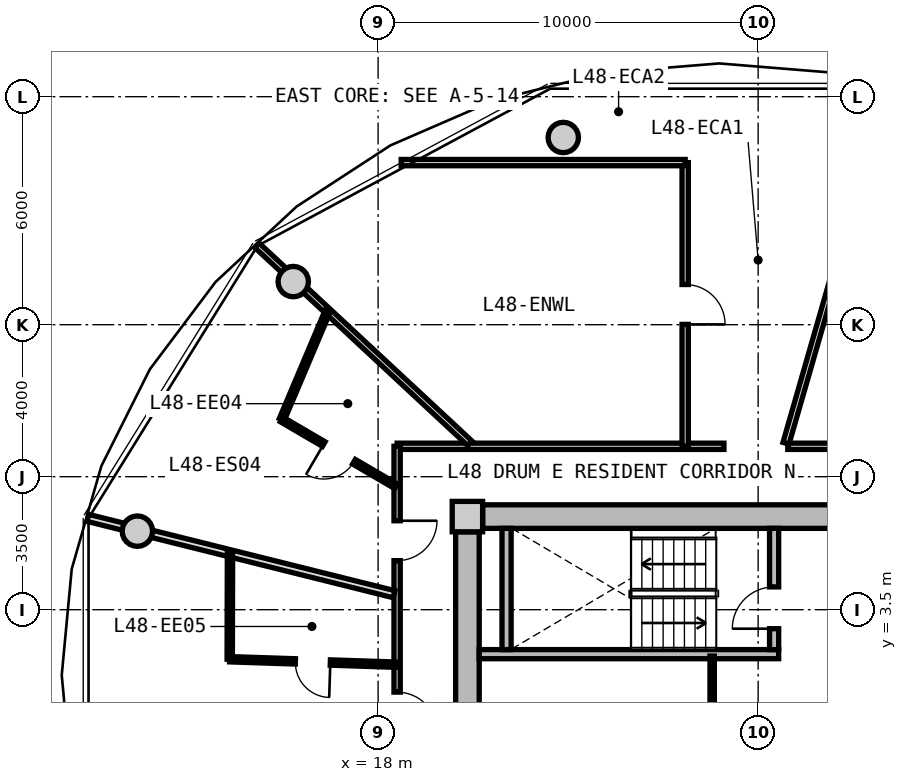
"""IFC4 building model, lengths in metres.
Left out: names, types, materials, properties, quantities, classifications, styles, units other than length and angle.
Written with IfcOpenShell. Run it as: python <this file> out.ifc"""

import sys

from ifc_helpers import new_model, si_unit, direction, frame, frame_2d, origin, origin_2d, place, context, subcontext, project, spatial, rectangle, circle, extrude, source, transform, mapped, element, fill, save


model = new_model("IFC4")
c1 = context("Model", 3, precision=1e-05, world=origin(), true_north=direction((0.0, 1.0)))
c2 = subcontext(c1, "Body", "Model", "MODEL_VIEW")
j1 = project(units=[si_unit("LENGTHUNIT", "METRE"), si_unit("PLANEANGLEUNIT", "RADIAN")], contexts=[c1])
p1 = place(None, origin())
s1 = spatial("IfcSite", under=j1, at=p1, CompositionType="ELEMENT")
p2 = place(p1, origin())
s2 = spatial("IfcBuilding", under=s1, at=p2, CompositionType="ELEMENT")
p3 = place(p2, frame((0.0, 0.0, 155.65)))
s3 = spatial("IfcBuildingStorey", under=s2, at=p3, CompositionType="ELEMENT", Elevation=155.65)
m1 = source(origin(), c2, "Body", "SweptSolid", [
    extrude(rectangle(XDim=0.8, YDim=0.8, at=origin_2d()), origin(), (0.0, 0.0, 1.0), 3.05),
])
p4 = place(p3, frame((20.35, 5.95, 0.0), z_axis=(0.0, 0.0, 1.0), x_axis=(1.0, 0.0, 0.0)))
e1 = element("IfcColumn", 1, at=p4, inside=s3, PredefinedType="COLUMN", context=c2, shape_type="MappedRepresentation", body=[
    mapped(m1, transform((0.0, 0.0, 0.0), x_axis=(1.0, 0.0, 0.0), y_axis=(0.0, 1.0, 0.0), z_axis=(0.0, 0.0, 1.0), scale=1.0)),
])
m2 = source(origin(), c2, "Body", "SweptSolid", [
    extrude(rectangle(XDim=14.5, YDim=0.62, at=frame_2d((7.25, 0.0))), origin(), (0.0, 0.0, 1.0), 2.81),
])
p5 = place(p3, frame((20.75, 5.95, 0.0), z_axis=(0.0, 0.0, 1.0), x_axis=(1.0, 0.0, 0.0)))
e2 = element("IfcWall", 2, at=p5, inside=s3, PredefinedType="SHEAR", context=c2, shape_type="MappedRepresentation", body=[
    mapped(m2, transform((0.0, 0.0, 0.0), x_axis=(1.0, 0.0, 0.0), y_axis=(0.0, 1.0, 0.0), z_axis=(0.0, 0.0, 1.0), scale=1.0)),
])
m3 = source(origin(), c2, "Body", "SweptSolid", [
    extrude(rectangle(XDim=11.1, YDim=0.62, at=frame_2d((5.55, 0.0))), origin(), (0.0, 0.0, 1.0), 2.81),
])
p6 = place(p3, frame((20.35, -5.55, 0.0), z_axis=(0.0, 0.0, 1.0), x_axis=(0.0, 1.0, 0.0)))
e3 = element("IfcWall", 3, at=p6, inside=s3, PredefinedType="SHEAR", context=c2, shape_type="MappedRepresentation", body=[
    mapped(m3, transform((0.0, 0.0, 0.0), x_axis=(1.0, 0.0, 0.0), y_axis=(0.0, 1.0, 0.0), z_axis=(0.0, 0.0, 1.0), scale=1.0)),
])
p7 = place(p6, frame((3.8, 0.0, 0.0)))
e4 = element("IfcOpeningElement", 4, at=p7, cuts=e3, PredefinedType="OPENING", context=c2, shape_type="SweptSolid", body=[
    extrude(rectangle(XDim=1.2, YDim=2.15, at=frame_2d((0.6, 1.075))), frame((0.0, 0.32, 0.0), z_axis=(0.0, -1.0, 0.0), x_axis=(1.0, 0.0, 0.0)), (0.0, 0.0, 1.0), 0.64),
])
m4 = source(origin(), c2, "Body", "SweptSolid", [
    extrude(circle(Radius=0.4, at=origin_2d()), origin(), (0.0, 0.0, 1.0), 3.05),
])
for number, where, z_axis, x_axis in (
    (5, (22.873, 15.926, 0.0), (0.0, 0.0, 1.0), (1.0, 0.0, 0.0)),
    (6, (15.767, 12.135, 0.0), (0.0, 0.0, 1.0), (1.0, 0.0, 0.0)),
    (7, (11.665, 5.567, 0.0), (0.0, 0.0, 1.0), (1.0, 0.0, 0.0)),
):
    element("IfcColumn", number, at=place(p3, frame(where, z_axis=z_axis, x_axis=x_axis)), inside=s3, PredefinedType="COLUMN", context=c2, shape_type="MappedRepresentation", body=[
        mapped(m4, transform((0.0, 0.0, 0.0), x_axis=(1.0, 0.0, 0.0), y_axis=(0.0, 1.0, 0.0), z_axis=(0.0, 0.0, 1.0), scale=1.0)),
    ])
m5 = source(origin(), c2, "Body", "SweptSolid", [
    extrude(rectangle(XDim=7.88, YDim=0.24, at=frame_2d((3.94, 0.0))), origin(), (0.0, 0.0, 1.0), 2.81),
])
p8 = place(p3, frame((20.66, 2.33, 0.0), z_axis=(0.0, 0.0, 1.0), x_axis=(1.0, 0.0, 0.0)))
e8 = element("IfcWall", 8, at=p8, inside=s3, PredefinedType="PARTITIONING", context=c2, shape_type="MappedRepresentation", body=[
    mapped(m5, transform((0.0, 0.0, 0.0), x_axis=(1.0, 0.0, 0.0), y_axis=(0.0, 1.0, 0.0), z_axis=(0.0, 0.0, 1.0), scale=1.0)),
])
m6 = source(origin(), c2, "Body", "SweptSolid", [
    extrude(rectangle(XDim=3.19, YDim=0.24, at=frame_2d((1.595, 0.0))), origin(), (0.0, 0.0, 1.0), 2.81),
])
p9 = place(p3, frame((21.38, 2.45, 0.0), z_axis=(0.0, 0.0, 1.0), x_axis=(0.0, 1.0, 0.0)))
e9 = element("IfcWall", 9, at=p9, inside=s3, PredefinedType="PARTITIONING", context=c2, shape_type="MappedRepresentation", body=[
    mapped(m6, transform((0.0, 0.0, 0.0), x_axis=(1.0, 0.0, 0.0), y_axis=(0.0, 1.0, 0.0), z_axis=(0.0, 0.0, 1.0), scale=1.0)),
])
p10 = place(p3, frame((28.42, 2.45, 0.0), z_axis=(0.0, 0.0, 1.0), x_axis=(0.0, 1.0, 0.0)))
e10 = element("IfcWall", 10, at=p10, inside=s3, PredefinedType="PARTITIONING", context=c2, shape_type="MappedRepresentation", body=[
    mapped(m6, transform((0.0, 0.0, 0.0), x_axis=(1.0, 0.0, 0.0), y_axis=(0.0, 1.0, 0.0), z_axis=(0.0, 0.0, 1.0), scale=1.0)),
])
p11 = place(p10, frame((0.55, 0.0, 0.0)))
e11 = element("IfcOpeningElement", 11, at=p11, cuts=e10, PredefinedType="OPENING", context=c2, shape_type="SweptSolid", body=[
    extrude(rectangle(XDim=1.1, YDim=2.15, at=frame_2d((0.55, 1.075))), frame((0.0, 0.13, 0.0), z_axis=(0.0, -1.0, 0.0), x_axis=(1.0, 0.0, 0.0)), (0.0, 0.0, 1.0), 0.26),
])
m7 = source(origin(), c2, "Body", "SweptSolid", [
    extrude(rectangle(XDim=2.33, YDim=0.115, at=frame_2d((1.165, 0.0))), origin(), (0.0, 0.0, 1.0), 2.795),
])
p12 = place(p3, frame((26.79, -0.05, 0.0), z_axis=(0.0, 0.0, 1.0), x_axis=(0.0, 1.0, 0.0)))
e12 = element("IfcWall", 12, at=p12, inside=s3, PredefinedType="PARTITIONING", context=c2, shape_type="MappedRepresentation", body=[
    mapped(m7, transform((0.0, 0.0, 0.0), x_axis=(1.0, 0.0, 0.0), y_axis=(0.0, 1.0, 0.0), z_axis=(0.0, 0.0, 1.0), scale=1.0)),
])
m8 = source(origin(), c2, "Body", "SweptSolid", [
    extrude(rectangle(XDim=8.6, YDim=0.165, at=frame_2d((4.3, 0.0))), origin(), (0.0, 0.0, 1.0), 2.795),
])
p13 = place(p3, frame((18.5, 7.8, 0.0), z_axis=(0.0, 0.0, 1.0), x_axis=(1.0, 0.0, 0.0)))
e13 = element("IfcWall", 13, at=p13, inside=s3, PredefinedType="PARTITIONING", context=c2, shape_type="MappedRepresentation", body=[
    mapped(m8, transform((0.0, 0.0, 0.0), x_axis=(1.0, 0.0, 0.0), y_axis=(0.0, 1.0, 0.0), z_axis=(0.0, 0.0, 1.0), scale=1.0)),
])
m9 = source(origin(), c2, "Body", "SweptSolid", [
    extrude(rectangle(XDim=8.719, YDim=0.165, at=frame_2d((4.36, 0.0))), origin(), (0.0, 0.0, 1.0), 2.795),
])
p14 = place(p3, frame((28.781, 7.8, 0.0), z_axis=(0.0, 0.0, 1.0), x_axis=(1.0, 0.0, 0.0)))
e14 = element("IfcWall", 14, at=p14, inside=s3, PredefinedType="PARTITIONING", context=c2, shape_type="MappedRepresentation", body=[
    mapped(m9, transform((0.0, 0.0, 0.0), x_axis=(1.0, 0.0, 0.0), y_axis=(0.0, 1.0, 0.0), z_axis=(0.0, 0.0, 1.0), scale=1.0)),
])
p15 = place(p14, frame((6.054, 0.0, 0.0)))
e15 = element("IfcOpeningElement", 15, at=p15, cuts=e14, PredefinedType="OPENING", context=c2, shape_type="SweptSolid", body=[
    extrude(rectangle(XDim=1.05, YDim=2.15, at=frame_2d((0.525, 1.075))), frame((0.0, 0.093, 0.0), z_axis=(0.0, -1.0, 0.0), x_axis=(1.0, 0.0, 0.0)), (0.0, 0.0, 1.0), 0.185),
])
p16 = place(p14, frame((1.891, 0.0, 0.0)))
e16 = element("IfcOpeningElement", 16, at=p16, cuts=e14, PredefinedType="OPENING", context=c2, shape_type="SweptSolid", body=[
    extrude(rectangle(XDim=1.25, YDim=2.2, at=frame_2d((0.625, 1.1))), frame((0.0, 0.093, 0.0), z_axis=(0.0, -1.0, 0.0), x_axis=(1.0, 0.0, 0.0)), (0.0, 0.0, 1.0), 0.185),
])
m10 = source(origin(), c2, "Body", "SweptSolid", [
    extrude(rectangle(XDim=15.6, YDim=0.165, at=frame_2d((7.8, 0.0))), origin(), (0.0, 0.0, 1.0), 2.795),
])
p17 = place(p3, frame((18.5, -7.8, 0.0), z_axis=(0.0, 0.0, 1.0), x_axis=(0.0, 1.0, 0.0)))
e17 = element("IfcWall", 17, at=p17, inside=s3, PredefinedType="PARTITIONING", context=c2, shape_type="MappedRepresentation", body=[
    mapped(m10, transform((0.0, 0.0, 0.0), x_axis=(1.0, 0.0, 0.0), y_axis=(0.0, 1.0, 0.0), z_axis=(0.0, 0.0, 1.0), scale=1.0)),
])
p18 = place(p17, frame((12.591, 0.0, 0.0)))
e18 = element("IfcOpeningElement", 18, at=p18, cuts=e17, PredefinedType="OPENING", context=c2, shape_type="SweptSolid", body=[
    extrude(rectangle(XDim=1.05, YDim=2.15, at=frame_2d((0.525, 1.075))), frame((0.0, 0.093, 0.0), z_axis=(0.0, -1.0, 0.0), x_axis=(1.0, 0.0, 0.0)), (0.0, 0.0, 1.0), 0.185),
])
p19 = place(p17, frame((8.081, 0.0, 0.0)))
e19 = element("IfcOpeningElement", 19, at=p19, cuts=e17, PredefinedType="OPENING", context=c2, shape_type="SweptSolid", body=[
    extrude(rectangle(XDim=1.05, YDim=2.15, at=frame_2d((0.525, 1.075))), frame((0.0, 0.093, 0.0), z_axis=(0.0, -1.0, 0.0), x_axis=(1.0, 0.0, 0.0)), (0.0, 0.0, 1.0), 0.185),
])
p20 = place(p17, frame((2.854, 0.0, 0.0)))
e20 = element("IfcOpeningElement", 20, at=p20, cuts=e17, PredefinedType="OPENING", context=c2, shape_type="SweptSolid", body=[
    extrude(rectangle(XDim=1.05, YDim=2.15, at=frame_2d((0.525, 1.075))), frame((0.0, 0.093, 0.0), z_axis=(0.0, -1.0, 0.0), x_axis=(1.0, 0.0, 0.0)), (0.0, 0.0, 1.0), 0.185),
])
p21 = place(p17, frame((0.452, 0.0, 0.0)))
e21 = element("IfcOpeningElement", 21, at=p21, cuts=e17, PredefinedType="OPENING", context=c2, shape_type="SweptSolid", body=[
    extrude(rectangle(XDim=0.92, YDim=2.1, at=frame_2d((0.46, 1.05))), frame((0.0, 0.093, 0.0), z_axis=(0.0, -1.0, 0.0), x_axis=(1.0, 0.0, 0.0)), (0.0, 0.0, 1.0), 0.185),
])
m11 = source(origin(), c2, "Body", "SweptSolid", [
    extrude(rectangle(XDim=9.73, YDim=0.165, at=frame_2d((4.865, 0.0))), origin(), (0.0, 0.0, 1.0), 2.345),
])
p22 = place(p3, frame((28.733, 7.88, 0.0), z_axis=(0.0, 0.0, 1.0), x_axis=(0.27679492614, 0.960929013436, 0.0)))
e22 = element("IfcWall", 22, at=p22, inside=s3, PredefinedType="PARTITIONING", context=c2, shape_type="MappedRepresentation", body=[
    mapped(m11, transform((0.0, 0.0, 0.0), x_axis=(1.0, 0.0, 0.0), y_axis=(0.0, 1.0, 0.0), z_axis=(0.0, 0.0, 1.0), scale=1.0)),
])
m12 = source(origin(), c2, "Body", "SweptSolid", [
    extrude(rectangle(XDim=7.648, YDim=0.165, at=frame_2d((3.824, 0.0))), origin(), (0.0, 0.0, 1.0), 2.345),
])
p23 = place(p3, frame((20.413, 7.88, 0.0), z_axis=(0.0, 0.0, 1.0), x_axis=(-0.732182665826, 0.681108320213, 0.0)))
e23 = element("IfcWall", 23, at=p23, inside=s3, PredefinedType="PARTITIONING", context=c2, shape_type="MappedRepresentation", body=[
    mapped(m12, transform((0.0, 0.0, 0.0), x_axis=(1.0, 0.0, 0.0), y_axis=(0.0, 1.0, 0.0), z_axis=(0.0, 0.0, 1.0), scale=1.0)),
])
m13 = source(origin(), c2, "Body", "SweptSolid", [
    extrude(rectangle(XDim=7.465, YDim=0.165, at=frame_2d((3.733, 0.0))), origin(), (0.0, 0.0, 1.0), 2.795),
])
p24 = place(p3, frame((26.08, 7.8, 0.0), z_axis=(0.0, 0.0, 1.0), x_axis=(0.0, 1.0, 0.0)))
e24 = element("IfcWall", 24, at=p24, inside=s3, PredefinedType="PARTITIONING", context=c2, shape_type="MappedRepresentation", body=[
    mapped(m13, transform((0.0, 0.0, 0.0), x_axis=(1.0, 0.0, 0.0), y_axis=(0.0, 1.0, 0.0), z_axis=(0.0, 0.0, 1.0), scale=1.0)),
])
p25 = place(p24, frame((3.208, 0.0, 0.0)))
e25 = element("IfcOpeningElement", 25, at=p25, cuts=e24, PredefinedType="OPENING", context=c2, shape_type="SweptSolid", body=[
    extrude(rectangle(XDim=1.05, YDim=2.15, at=frame_2d((0.525, 1.075))), frame((0.0, 0.093, 0.0), z_axis=(0.0, -1.0, 0.0), x_axis=(1.0, 0.0, 0.0)), (0.0, 0.0, 1.0), 0.185),
])
m14 = source(origin(), c2, "Body", "SweptSolid", [
    extrude(rectangle(XDim=7.473, YDim=0.165, at=frame_2d((3.737, 0.0))), origin(), (0.0, 0.0, 1.0), 2.795),
])
p26 = place(p3, frame((18.607, 15.265, 0.0), z_axis=(0.0, 0.0, 1.0), x_axis=(1.0, 0.0, 0.0)))
e26 = element("IfcWall", 26, at=p26, inside=s3, PredefinedType="PARTITIONING", context=c2, shape_type="MappedRepresentation", body=[
    mapped(m14, transform((0.0, 0.0, 0.0), x_axis=(1.0, 0.0, 0.0), y_axis=(0.0, 1.0, 0.0), z_axis=(0.0, 0.0, 1.0), scale=1.0)),
])
m15 = source(origin(), c2, "Body", "SweptSolid", [
    extrude(rectangle(XDim=8.305, YDim=0.19, at=frame_2d((4.153, 0.0))), origin(), (0.0, 0.0, 1.0), 2.345),
])
p27 = place(p3, frame((18.42, 3.908, 0.0), z_axis=(0.0, 0.0, 1.0), x_axis=(-0.970309994378, 0.241864662175, 0.0)))
e27 = element("IfcWall", 27, at=p27, inside=s3, PredefinedType="PARTITIONING", context=c2, shape_type="MappedRepresentation", body=[
    mapped(m15, transform((0.0, 0.0, 0.0), x_axis=(1.0, 0.0, 0.0), y_axis=(0.0, 1.0, 0.0), z_axis=(0.0, 0.0, 1.0), scale=1.0)),
])
m16 = source(origin(), c2, "Body", "SweptSolid", [
    extrude(rectangle(XDim=3.481, YDim=0.14, at=frame_2d((1.74, 0.0))), origin(), (0.0, 0.0, 1.0), 2.795),
])
p28 = place(p3, frame((18.47, 6.748, 0.0), z_axis=(0.0, 0.0, 1.0), x_axis=(-0.863310428788, 0.504673264148, 0.0)))
e28 = element("IfcWall", 28, at=p28, inside=s3, PredefinedType="PARTITIONING", context=c2, shape_type="MappedRepresentation", body=[
    mapped(m16, transform((0.0, 0.0, 0.0), x_axis=(1.0, 0.0, 0.0), y_axis=(0.0, 1.0, 0.0), z_axis=(0.0, 0.0, 1.0), scale=1.0)),
])
p29 = place(p28, frame((1.28, 0.0, 0.0)))
e29 = element("IfcOpeningElement", 29, at=p29, cuts=e28, PredefinedType="OPENING", context=c2, shape_type="SweptSolid", body=[
    extrude(rectangle(XDim=0.92, YDim=2.1, at=frame_2d((0.46, 1.05))), frame((0.0, 0.08, 0.0), z_axis=(0.0, -1.0, 0.0), x_axis=(1.0, 0.0, 0.0)), (0.0, 0.0, 1.0), 0.16),
])
m17 = source(origin(), c2, "Body", "SweptSolid", [
    extrude(rectangle(XDim=3.142, YDim=0.14, at=frame_2d((1.571, 0.0))), origin(), (0.0, 0.0, 1.0), 2.795),
])
p30 = place(p3, frame((15.465, 8.504, 0.0), z_axis=(0.0, 0.0, 1.0), x_axis=(0.389855410514, 0.920876082268, 0.0)))
e30 = element("IfcWall", 30, at=p30, inside=s3, PredefinedType="PARTITIONING", context=c2, shape_type="MappedRepresentation", body=[
    mapped(m17, transform((0.0, 0.0, 0.0), x_axis=(1.0, 0.0, 0.0), y_axis=(0.0, 1.0, 0.0), z_axis=(0.0, 0.0, 1.0), scale=1.0)),
])
m18 = source(origin(), c2, "Body", "SweptSolid", [
    extrude(rectangle(XDim=4.377, YDim=0.14, at=frame_2d((2.188, 0.0))), origin(), (0.0, 0.0, 1.0), 2.795),
])
p31 = place(p3, frame((18.47, 2.053, 0.0), z_axis=(0.0, 0.0, 1.0), x_axis=(-0.99946745582, 0.032631346225, 0.0)))
e31 = element("IfcWall", 31, at=p31, inside=s3, PredefinedType="PARTITIONING", context=c2, shape_type="MappedRepresentation", body=[
    mapped(m18, transform((0.0, 0.0, 0.0), x_axis=(1.0, 0.0, 0.0), y_axis=(0.0, 1.0, 0.0), z_axis=(0.0, 0.0, 1.0), scale=1.0)),
])
p32 = place(p31, frame((1.729, 0.0, 0.0)))
e32 = element("IfcOpeningElement", 32, at=p32, cuts=e31, PredefinedType="OPENING", context=c2, shape_type="SweptSolid", body=[
    extrude(rectangle(XDim=0.92, YDim=2.1, at=frame_2d((0.46, 1.05))), frame((0.0, 0.08, 0.0), z_axis=(0.0, -1.0, 0.0), x_axis=(1.0, 0.0, 0.0)), (0.0, 0.0, 1.0), 0.16),
])
m19 = source(origin(), c2, "Body", "SweptSolid", [
    extrude(rectangle(XDim=2.806, YDim=0.14, at=frame_2d((1.403, 0.0))), origin(), (0.0, 0.0, 1.0), 2.795),
])
p33 = place(p3, frame((14.095, 2.196, 0.0), z_axis=(0.0, 0.0, 1.0), x_axis=(0.002435834444, 0.999997033351, 0.0)))
e33 = element("IfcWall", 33, at=p33, inside=s3, PredefinedType="PARTITIONING", context=c2, shape_type="MappedRepresentation", body=[
    mapped(m19, transform((0.0, 0.0, 0.0), x_axis=(1.0, 0.0, 0.0), y_axis=(0.0, 1.0, 0.0), z_axis=(0.0, 0.0, 1.0), scale=1.0)),
])
m20 = source(origin(), c2, "Body", "SweptSolid", [
    extrude(rectangle(XDim=1.1, YDim=2.15, at=frame_2d((0.55, 1.075))), frame((0.0, 0.025, 0.0), z_axis=(0.0, -1.0, 0.0), x_axis=(1.0, 0.0, 0.0)), (0.0, 0.0, 1.0), 0.05),
])
p34 = place(p11, origin())
e34 = element("IfcDoor", 34, at=p34, inside=s3, OperationType="SINGLE_SWING_LEFT", PredefinedType="DOOR", context=c2, shape_type="MappedRepresentation", body=[
    mapped(m20, transform((0.0, 0.0, 0.0), x_axis=(1.0, 0.0, 0.0), y_axis=(0.0, 1.0, 0.0), z_axis=(0.0, 0.0, 1.0), scale=1.0)),
])
fill(e11, e34)
m21 = source(origin(), c2, "Body", "SweptSolid", [
    extrude(rectangle(XDim=1.05, YDim=2.15, at=frame_2d((0.525, 1.075))), frame((0.0, 0.025, 0.0), z_axis=(0.0, -1.0, 0.0), x_axis=(1.0, 0.0, 0.0)), (0.0, 0.0, 1.0), 0.05),
])
p35 = place(p25, frame((1.05, 0.0, 0.0), z_axis=(0.0, 0.0, 1.0), x_axis=(-1.0, 0.0, 0.0)))
e35 = element("IfcDoor", 35, at=p35, inside=s3, OperationType="SINGLE_SWING_RIGHT", PredefinedType="DOOR", context=c2, shape_type="MappedRepresentation", body=[
    mapped(m21, transform((0.0, 0.0, 0.0), x_axis=(1.0, 0.0, 0.0), y_axis=(0.0, 1.0, 0.0), z_axis=(0.0, 0.0, 1.0), scale=1.0)),
])
fill(e25, e35)
p36 = place(p18, frame((1.05, 0.0, 0.0), z_axis=(0.0, 0.0, 1.0), x_axis=(-1.0, 0.0, 0.0)))
e36 = element("IfcDoor", 36, at=p36, inside=s3, OperationType="SINGLE_SWING_LEFT", PredefinedType="DOOR", context=c2, shape_type="MappedRepresentation", body=[
    mapped(m21, transform((0.0, 0.0, 0.0), x_axis=(1.0, 0.0, 0.0), y_axis=(0.0, 1.0, 0.0), z_axis=(0.0, 0.0, 1.0), scale=1.0)),
])
fill(e18, e36)
m22 = source(origin(), c2, "Body", "SweptSolid", [
    extrude(rectangle(XDim=0.92, YDim=2.1, at=frame_2d((0.46, 1.05))), frame((0.0, 0.025, 0.0), z_axis=(0.0, -1.0, 0.0), x_axis=(1.0, 0.0, 0.0)), (0.0, 0.0, 1.0), 0.05),
])
p37 = place(p29, origin())
e37 = element("IfcDoor", 37, at=p37, inside=s3, OperationType="SINGLE_SWING_RIGHT", PredefinedType="DOOR", context=c2, shape_type="MappedRepresentation", body=[
    mapped(m22, transform((0.0, 0.0, 0.0), x_axis=(1.0, 0.0, 0.0), y_axis=(0.0, 1.0, 0.0), z_axis=(0.0, 0.0, 1.0), scale=1.0)),
])
fill(e29, e37)
p38 = place(p19, frame((1.05, 0.0, 0.0), z_axis=(0.0, 0.0, 1.0), x_axis=(-1.0, 0.0, 0.0)))
e38 = element("IfcDoor", 38, at=p38, inside=s3, OperationType="SINGLE_SWING_RIGHT", PredefinedType="DOOR", context=c2, shape_type="MappedRepresentation", body=[
    mapped(m21, transform((0.0, 0.0, 0.0), x_axis=(1.0, 0.0, 0.0), y_axis=(0.0, 1.0, 0.0), z_axis=(0.0, 0.0, 1.0), scale=1.0)),
])
fill(e19, e38)
p39 = place(p32, origin())
e39 = element("IfcDoor", 39, at=p39, inside=s3, OperationType="SINGLE_SWING_LEFT", PredefinedType="DOOR", context=c2, shape_type="MappedRepresentation", body=[
    mapped(m22, transform((0.0, 0.0, 0.0), x_axis=(1.0, 0.0, 0.0), y_axis=(0.0, 1.0, 0.0), z_axis=(0.0, 0.0, 1.0), scale=1.0)),
])
fill(e32, e39)
save(model, sys.argv[1])
